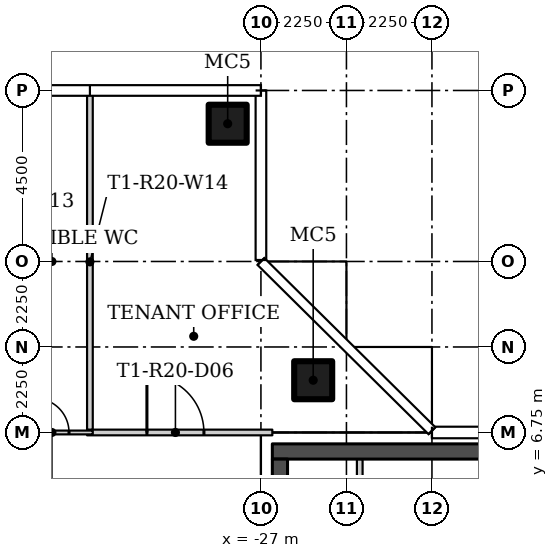
"""IFC4 building model, lengths in metres.
Left out: names, types, materials, properties, quantities, classifications, styles, units other than length and angle.
Written with IfcOpenShell. Run it as: python <this file> out.ifc"""

import sys

from ifc_helpers import new_model, si_unit, direction, frame, frame_2d, origin, origin_2d, place, context, subcontext, project, spatial, rectangle, hollow_rectangle, extrude, element, fill, save


model = new_model("IFC4")
c1 = context("Model", 3, precision=1e-05, world=origin(), true_north=direction((0.0, 1.0)))
c2 = subcontext(c1, "Body", "Model", "MODEL_VIEW")
j1 = project(units=[si_unit("LENGTHUNIT", "METRE"), si_unit("PLANEANGLEUNIT", "RADIAN")], contexts=[c1])
p1 = place(None, origin())
s1 = spatial("IfcSite", under=j1, at=p1, CompositionType="ELEMENT")
p2 = place(p1, origin())
s2 = spatial("IfcBuilding", under=s1, at=p2, CompositionType="ELEMENT")
p3 = place(p2, frame((0.0, 0.0, 186.6)))
s3 = spatial("IfcBuildingStorey", under=s2, at=p3, CompositionType="ELEMENT", Elevation=186.6)
for number, where in (
    (1, (-25.625, 8.125, 0.0)),
    (2, (-27.875, 14.875, 0.0)),
):
    element("IfcColumn", number, at=place(p3, frame(where)), inside=s3, PredefinedType="COLUMN", context=c2, shape_type="SweptSolid", body=[
        extrude(hollow_rectangle(XDim=1.0, YDim=1.0, WallThickness=0.04, at=origin_2d()), origin(), (0.0, 0.0, 1.0), 3.55),
    ])
p4 = place(p3, frame((-31.575, 6.75, 0.0)))
e3 = element("IfcWall", 3, at=p4, inside=s3, PredefinedType="PARTITIONING", context=c2, shape_type="SweptSolid", body=[
    extrude(rectangle(XDim=4.875, YDim=0.15, at=frame_2d((2.438, 0.0))), origin(), (0.0, 0.0, 1.0), 3.55),
])
p5 = place(p4, frame((1.575, 0.0, 0.0)))
e4 = element("IfcOpeningElement", 4, at=p5, cuts=e3, PredefinedType="OPENING", context=c2, shape_type="SweptSolid", body=[
    extrude(rectangle(XDim=1.5, YDim=2.1, at=frame_2d((0.75, 1.05))), frame((0.0, 0.085, 0.0), z_axis=(0.0, -1.0, 0.0), x_axis=(1.0, 0.0, 0.0)), (0.0, 0.0, 1.0), 0.17),
])
p6 = place(p3, frame((-36.075, 6.75, 0.0)))
e5 = element("IfcWall", 5, at=p6, inside=s3, PredefinedType="PARTITIONING", context=c2, shape_type="SweptSolid", body=[
    extrude(rectangle(XDim=4.65, YDim=0.1, at=frame_2d((2.325, 0.0))), origin(), (0.0, 0.0, 1.0), 3.55),
])
p7 = place(p6, frame((0.875, 0.0, 0.0)))
e6 = element("IfcOpeningElement", 6, at=p7, cuts=e5, PredefinedType="OPENING", context=c2, shape_type="SweptSolid", body=[
    extrude(rectangle(XDim=0.9, YDim=2.1, at=frame_2d((0.45, 1.05))), frame((0.0, 0.06, 0.0), z_axis=(0.0, -1.0, 0.0), x_axis=(1.0, 0.0, 0.0)), (0.0, 0.0, 1.0), 0.12),
])
p8 = place(p6, frame((3.125, 0.0, 0.0)))
e7 = element("IfcOpeningElement", 7, at=p8, cuts=e5, PredefinedType="OPENING", context=c2, shape_type="SweptSolid", body=[
    extrude(rectangle(XDim=0.9, YDim=2.1, at=frame_2d((0.45, 1.05))), frame((0.0, 0.06, 0.0), z_axis=(0.0, -1.0, 0.0), x_axis=(1.0, 0.0, 0.0)), (0.0, 0.0, 1.0), 0.12),
])
p9 = place(p3, frame((-31.5, 6.825, 0.0), z_axis=(0.0, 0.0, 1.0), x_axis=(0.0, 1.0, 0.0)))
e8 = element("IfcWall", 8, at=p9, inside=s3, PredefinedType="PARTITIONING", context=c2, shape_type="SweptSolid", body=[
    extrude(rectangle(XDim=8.83, YDim=0.15, at=frame_2d((4.415, 0.0))), origin(), (0.0, 0.0, 1.0), 3.55),
])
p10 = place(p3, frame((-26.7, 6.25, 0.0)))
e9 = element("IfcWall", 9, at=p10, inside=s3, PredefinedType="SHEAR", context=c2, shape_type="SweptSolid", body=[
    extrude(rectangle(XDim=12.9, YDim=0.4, at=frame_2d((6.45, 0.0))), origin(), (0.0, 0.0, 1.0), 3.55),
])
p11 = place(p3, frame((-26.5, 6.05, 0.0), z_axis=(0.0, 0.0, 1.0), x_axis=(0.0, -1.0, 0.0)))
e10 = element("IfcWall", 10, at=p11, inside=s3, PredefinedType="SHEAR", context=c2, shape_type="SweptSolid", body=[
    extrude(rectangle(XDim=12.1, YDim=0.4, at=frame_2d((6.05, 0.0))), origin(), (0.0, 0.0, 1.0), 3.55),
])
p12 = place(p11, frame((3.9, 0.0, 0.0)))
e11 = element("IfcOpeningElement", 11, at=p12, cuts=e10, PredefinedType="OPENING", context=c2, shape_type="SweptSolid", body=[
    extrude(rectangle(XDim=1.8, YDim=2.4, at=frame_2d((0.9, 1.2))), frame((0.0, 0.21, 0.0), z_axis=(0.0, -1.0, 0.0), x_axis=(1.0, 0.0, 0.0)), (0.0, 0.0, 1.0), 0.42),
])
p13 = place(p3, frame((-24.4, 3.25, 0.0), z_axis=(0.0, 0.0, 1.0), x_axis=(0.0, 1.0, 0.0)))
e12 = element("IfcWall", 12, at=p13, inside=s3, PredefinedType="PARTITIONING", context=c2, shape_type="SweptSolid", body=[
    extrude(rectangle(XDim=2.8, YDim=0.15, at=frame_2d((1.4, 0.0))), origin(), (0.0, 0.0, 1.0), 3.55),
])
p14 = place(p8, origin())
e13 = element("IfcDoor", 13, at=p14, inside=s3, OperationType="SINGLE_SWING_RIGHT", PredefinedType="DOOR", context=c2, shape_type="SweptSolid", body=[
    extrude(rectangle(XDim=0.9, YDim=2.1, at=frame_2d((0.45, 1.05))), frame((0.0, 0.025, 0.0), z_axis=(0.0, -1.0, 0.0), x_axis=(1.0, 0.0, 0.0)), (0.0, 0.0, 1.0), 0.05),
])
fill(e7, e13)
p15 = place(p5, origin())
e14 = element("IfcDoor", 14, at=p15, inside=s3, OperationType="DOUBLE_DOOR_SINGLE_SWING", PredefinedType="DOOR", context=c2, shape_type="SweptSolid", body=[
    extrude(rectangle(XDim=1.5, YDim=2.1, at=frame_2d((0.75, 1.05))), frame((0.0, 0.025, 0.0), z_axis=(0.0, -1.0, 0.0), x_axis=(1.0, 0.0, 0.0)), (0.0, 0.0, 1.0), 0.05),
])
fill(e4, e14)
save(model, sys.argv[1])
